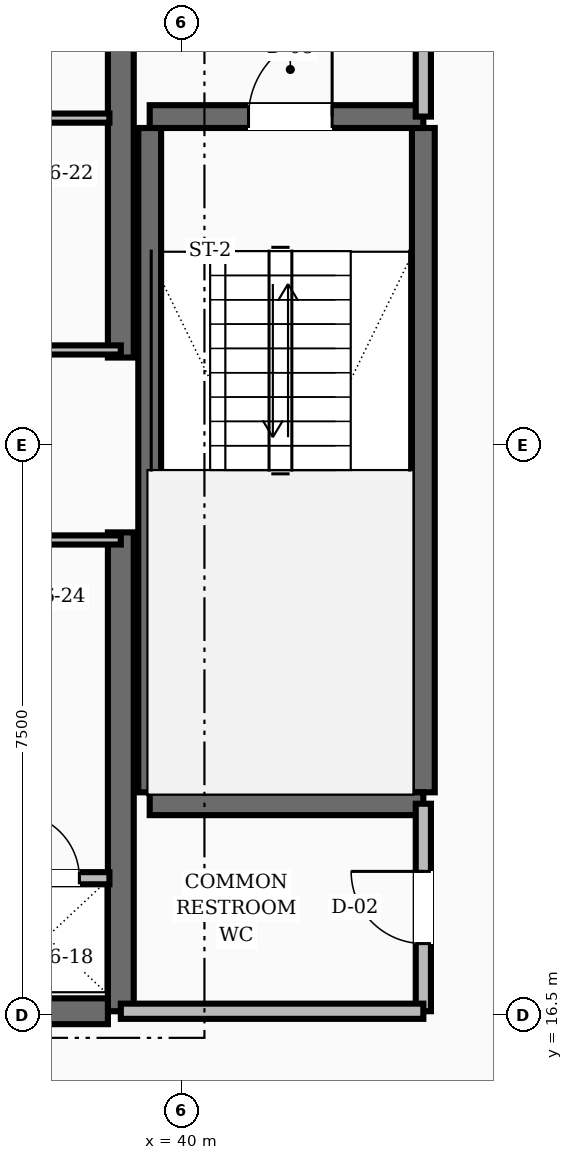
"""IFC4 building model, lengths in metres.
Left out: names, types, materials, properties, quantities, classifications, styles, units other than length and angle.
Written with IfcOpenShell. Run it as: python <this file> out.ifc"""

import sys

from ifc_helpers import new_model, si_unit, direction, frame, frame_2d, origin, place, context, subcontext, project, spatial, rectangle, extrude, element, fill, save


model = new_model("IFC4")
c1 = context("Model", 3, precision=1e-05, world=origin(), true_north=direction((0.0, 1.0)))
c2 = subcontext(c1, "Body", "Model", "MODEL_VIEW")
j1 = project(units=[si_unit("LENGTHUNIT", "METRE"), si_unit("PLANEANGLEUNIT", "RADIAN")], contexts=[c1])
p1 = place(None, origin())
s1 = spatial("IfcSite", under=j1, at=p1, CompositionType="ELEMENT")
p2 = place(p1, origin())
s2 = spatial("IfcBuilding", under=s1, at=p2, CompositionType="ELEMENT")
p3 = place(p2, frame((0.0, 0.0, 178.4)))
s3 = spatial("IfcBuildingStorey", under=s2, at=p3, CompositionType="ELEMENT", Elevation=178.4)
for number, where, z_axis, x_axis in (
    (1, (39.2, 16.55, 0.0), (0.0, 0.0, 1.0), (0.0, 1.0, 0.0)),
    (2, (39.2, 25.15, 0.0), (0.0, 0.0, 1.0), (0.0, 1.0, 0.0)),
):
    element("IfcWall", number, at=place(p3, frame(where, z_axis=z_axis, x_axis=x_axis)), inside=s3, PredefinedType="SHEAR", context=c2, shape_type="SweptSolid", body=[
        extrude(rectangle(XDim=6.3, YDim=0.34, at=frame_2d((3.15, 0.0))), origin(), (0.0, 0.0, 1.0), 3.6),
    ])
p4 = place(p3, frame((35.8, 16.55, 0.0), z_axis=(0.0, 0.0, 1.0), x_axis=(1.0, 0.0, 0.0)))
e3 = element("IfcWall", 3, at=p4, inside=s3, PredefinedType="SHEAR", context=c2, shape_type="SweptSolid", body=[
    extrude(rectangle(XDim=3.23, YDim=0.34, at=frame_2d((1.615, 0.0))), origin(), (0.0, 0.0, 1.0), 3.6),
])
p5 = place(p4, frame((0.3, 0.0, 0.0)))
e4 = element("IfcOpeningElement", 4, at=p5, cuts=e3, PredefinedType="OPENING", context=c2, shape_type="SweptSolid", body=[
    extrude(rectangle(XDim=1.1, YDim=2.1, at=frame_2d((0.55, 1.05))), frame((0.0, 0.18, 0.0), z_axis=(0.0, -1.0, 0.0), x_axis=(1.0, 0.0, 0.0)), (0.0, 0.0, 1.0), 0.36),
])
for number, where, z_axis, x_axis in (
    (5, (43.18, 19.43, 0.0), (0.0, 0.0, 1.0), (0.0, 1.0, 0.0)),
    (6, (39.58, 19.43, 0.0), (0.0, 0.0, 1.0), (0.0, 1.0, 0.0)),
):
    element("IfcWall", number, at=place(p3, frame(where, z_axis=z_axis, x_axis=x_axis)), inside=s3, PredefinedType="SHEAR", context=c2, shape_type="SweptSolid", body=[
        extrude(rectangle(XDim=8.74, YDim=0.3, at=frame_2d((4.37, 0.0))), origin(), (0.0, 0.0, 1.0), 3.6),
    ])
p6 = place(p3, frame((39.58, 19.28, 0.0), z_axis=(0.0, 0.0, 1.0), x_axis=(1.0, 0.0, 0.0)))
e7 = element("IfcWall", 7, at=p6, inside=s3, PredefinedType="SHEAR", context=c2, shape_type="SweptSolid", body=[
    extrude(rectangle(XDim=3.6, YDim=0.3, at=frame_2d((1.8, 0.0))), origin(), (0.0, 0.0, 1.0), 3.6),
])
p7 = place(p3, frame((39.58, 28.32, 0.0), z_axis=(0.0, 0.0, 1.0), x_axis=(1.0, 0.0, 0.0)))
e8 = element("IfcWall", 8, at=p7, inside=s3, PredefinedType="SHEAR", context=c2, shape_type="SweptSolid", body=[
    extrude(rectangle(XDim=3.6, YDim=0.3, at=frame_2d((1.8, 0.0))), origin(), (0.0, 0.0, 1.0), 3.6),
])
p8 = place(p7, frame((1.3, 0.0, 0.0)))
e9 = element("IfcOpeningElement", 9, at=p8, cuts=e8, PredefinedType="OPENING", context=c2, shape_type="SweptSolid", body=[
    extrude(rectangle(XDim=1.1, YDim=2.1, at=frame_2d((0.55, 1.05))), frame((0.0, 0.16, 0.0), z_axis=(0.0, -1.0, 0.0), x_axis=(1.0, 0.0, 0.0)), (0.0, 0.0, 1.0), 0.32),
])
p9 = place(p3, frame((43.18, 28.32, 0.0), z_axis=(0.0, 0.0, 1.0), x_axis=(0.0, 1.0, 0.0)))
e10 = element("IfcWall", 10, at=p9, inside=s3, PredefinedType="SOLIDWALL", context=c2, shape_type="SweptSolid", body=[
    extrude(rectangle(XDim=3.13, YDim=0.2, at=frame_2d((1.565, 0.0))), origin(), (0.0, 0.0, 1.0), 2.8),
])
p10 = place(p9, frame((1.015, 0.0, 0.0)))
e11 = element("IfcOpeningElement", 11, at=p10, cuts=e10, PredefinedType="OPENING", context=c2, shape_type="SweptSolid", body=[
    extrude(rectangle(XDim=1.1, YDim=2.1, at=frame_2d((0.55, 1.05))), frame((0.0, 0.11, 0.0), z_axis=(0.0, -1.0, 0.0), x_axis=(1.0, 0.0, 0.0)), (0.0, 0.0, 1.0), 0.22),
])
p11 = place(p3, frame((43.18, 16.55, 0.0), z_axis=(0.0, 0.0, 1.0), x_axis=(0.0, 1.0, 0.0)))
e12 = element("IfcWall", 12, at=p11, inside=s3, PredefinedType="SOLIDWALL", context=c2, shape_type="SweptSolid", body=[
    extrude(rectangle(XDim=2.73, YDim=0.2, at=frame_2d((1.365, 0.0))), origin(), (0.0, 0.0, 1.0), 2.8),
])
p12 = place(p11, frame((0.89, 0.0, 0.0)))
e13 = element("IfcOpeningElement", 13, at=p12, cuts=e12, PredefinedType="OPENING", context=c2, shape_type="SweptSolid", body=[
    extrude(rectangle(XDim=0.95, YDim=2.1, at=frame_2d((0.475, 1.05))), frame((0.0, 0.11, 0.0), z_axis=(0.0, -1.0, 0.0), x_axis=(1.0, 0.0, 0.0)), (0.0, 0.0, 1.0), 0.22),
])
p13 = place(p3, frame((39.2, 16.55, 0.0), z_axis=(0.0, 0.0, 1.0), x_axis=(1.0, 0.0, 0.0)))
e14 = element("IfcWall", 14, at=p13, inside=s3, PredefinedType="SOLIDWALL", context=c2, shape_type="SweptSolid", body=[
    extrude(rectangle(XDim=3.98, YDim=0.2, at=frame_2d((1.99, 0.0))), origin(), (0.0, 0.0, 1.0), 2.8),
])
p14 = place(p3, frame((37.4, 18.3, 0.0), z_axis=(0.0, 0.0, 1.0), x_axis=(1.0, 0.0, 0.0)))
e15 = element("IfcWall", 15, at=p14, inside=s3, PredefinedType="SOLIDWALL", context=c2, shape_type="SweptSolid", body=[
    extrude(rectangle(XDim=1.65, YDim=0.16, at=frame_2d((0.825, 0.0))), origin(), (0.0, 0.0, 1.0), 2.8),
])
p15 = place(p14, frame((0.395, 0.0, 0.0)))
e16 = element("IfcOpeningElement", 16, at=p15, cuts=e15, PredefinedType="OPENING", context=c2, shape_type="SweptSolid", body=[
    extrude(rectangle(XDim=0.86, YDim=2.1, at=frame_2d((0.43, 1.05))), frame((0.0, 0.09, 0.0), z_axis=(0.0, -1.0, 0.0), x_axis=(1.0, 0.0, 0.0)), (0.0, 0.0, 1.0), 0.18),
])
for number, where, z_axis, x_axis in (
    (17, (37.4, 25.25, 0.0), (0.0, 0.0, 1.0), (1.0, 0.0, 0.0)),
    (18, (37.4, 22.75, 0.0), (0.0, 0.0, 1.0), (1.0, 0.0, 0.0)),
):
    element("IfcWall", number, at=place(p3, frame(where, z_axis=z_axis, x_axis=x_axis)), inside=s3, PredefinedType="PARTITIONING", context=c2, shape_type="SweptSolid", body=[
        extrude(rectangle(XDim=1.8, YDim=0.12, at=frame_2d((0.9, 0.0))), origin(), (0.0, 0.0, 1.0), 2.8),
    ])
p16 = place(p3, frame((37.4, 28.3, 0.0), z_axis=(0.0, 0.0, 1.0), x_axis=(1.0, 0.0, 0.0)))
e19 = element("IfcWall", 19, at=p16, inside=s3, PredefinedType="PARTITIONING", context=c2, shape_type="SweptSolid", body=[
    extrude(rectangle(XDim=1.65, YDim=0.12, at=frame_2d((0.825, 0.0))), origin(), (0.0, 0.0, 1.0), 2.8),
])
p17 = place(p8, origin())
e20 = element("IfcDoor", 20, at=p17, inside=s3, OperationType="SINGLE_SWING_RIGHT", PredefinedType="DOOR", context=c2, shape_type="SweptSolid", body=[
    extrude(rectangle(XDim=1.1, YDim=2.1, at=frame_2d((0.55, 1.05))), frame((0.0, 0.025, 0.0), z_axis=(0.0, -1.0, 0.0), x_axis=(1.0, 0.0, 0.0)), (0.0, 0.0, 1.0), 0.05),
])
fill(e9, e20)
p18 = place(p12, origin())
e21 = element("IfcDoor", 21, at=p18, inside=s3, OperationType="SINGLE_SWING_RIGHT", PredefinedType="DOOR", context=c2, shape_type="SweptSolid", body=[
    extrude(rectangle(XDim=0.95, YDim=2.1, at=frame_2d((0.475, 1.05))), frame((0.0, 0.025, 0.0), z_axis=(0.0, -1.0, 0.0), x_axis=(1.0, 0.0, 0.0)), (0.0, 0.0, 1.0), 0.05),
])
fill(e13, e21)
p19 = place(p15, origin())
e22 = element("IfcDoor", 22, at=p19, inside=s3, OperationType="SINGLE_SWING_LEFT", PredefinedType="TRAPDOOR", context=c2, shape_type="SweptSolid", body=[
    extrude(rectangle(XDim=0.86, YDim=2.1, at=frame_2d((0.43, 1.05))), frame((0.0, 0.025, 0.0), z_axis=(0.0, -1.0, 0.0), x_axis=(1.0, 0.0, 0.0)), (0.0, 0.0, 1.0), 0.05),
])
fill(e16, e22)
save(model, sys.argv[1])
